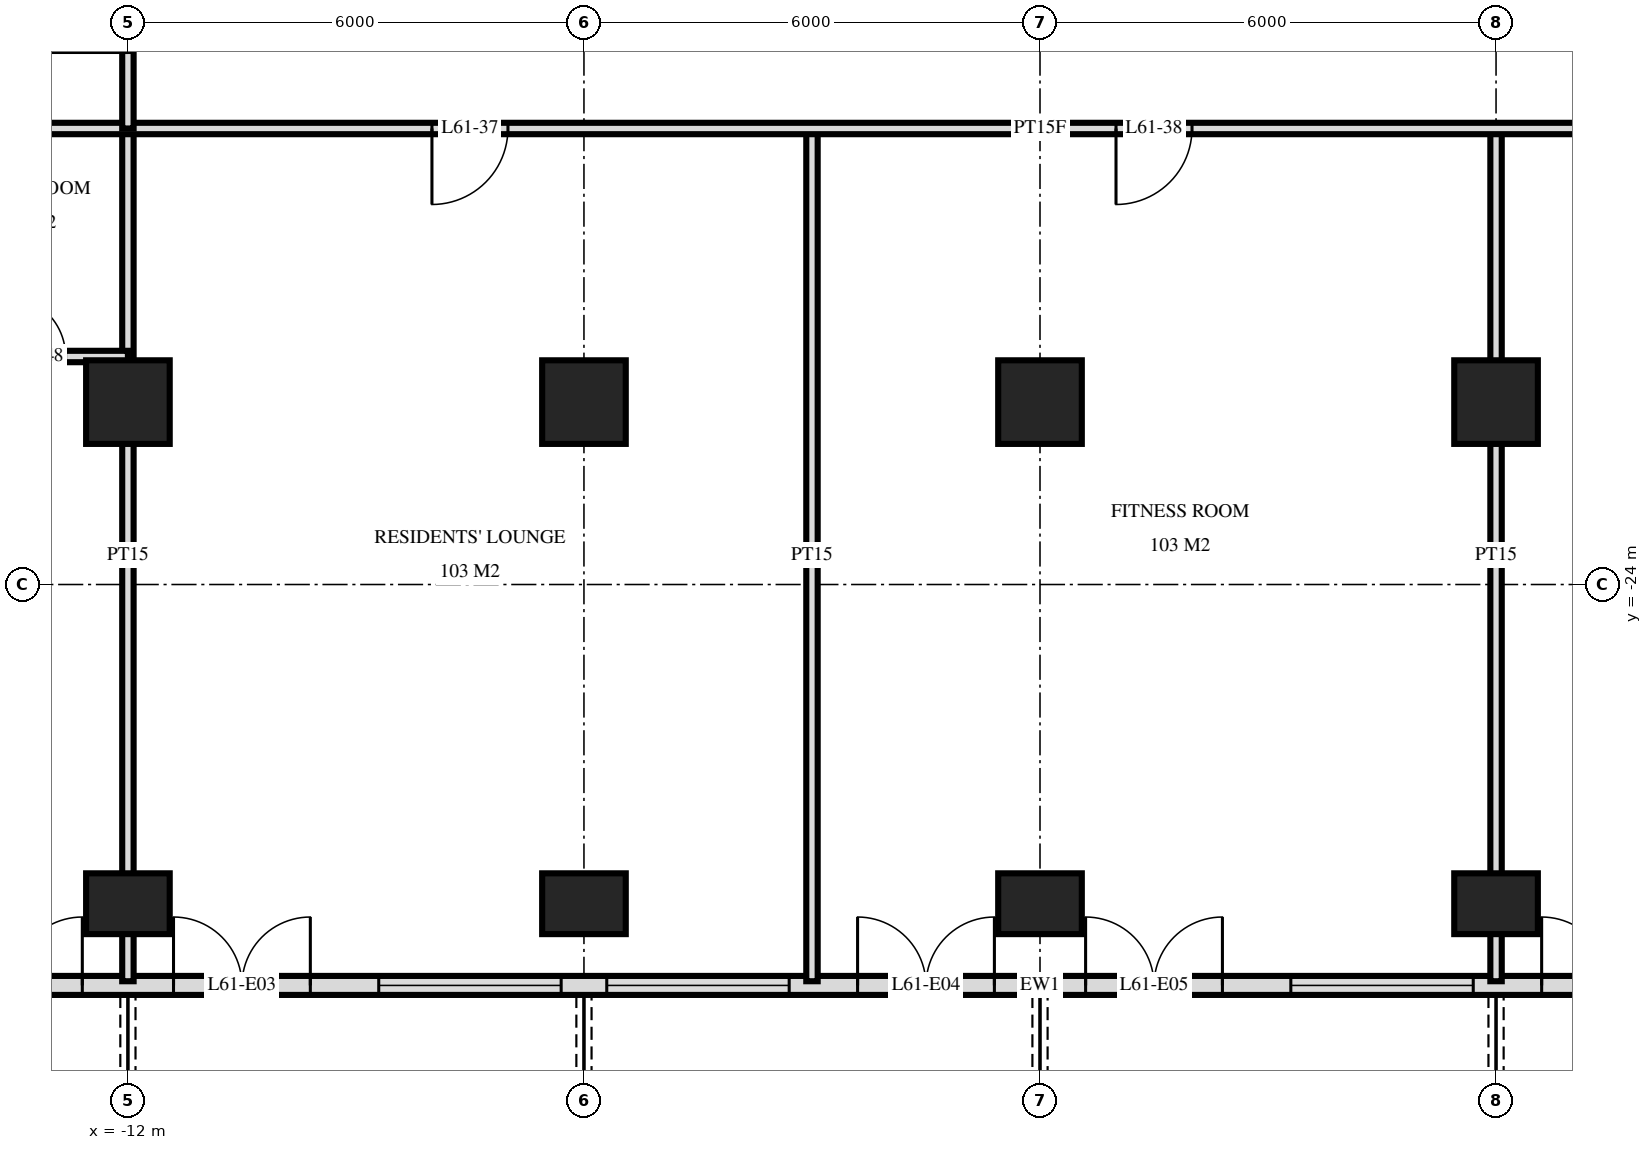
"""IFC4 building model, lengths in metres.
Left out: names, types, materials, properties, quantities, classifications, styles, units other than length and angle.
Written with IfcOpenShell. Run it as: python <this file> out.ifc"""

import sys

from ifc_helpers import new_model, si_unit, direction, frame, frame_2d, origin, origin_2d, place, context, subcontext, project, spatial, rectangle, extrude, element, fill, save


model = new_model("IFC4")
c1 = context("Model", 3, precision=1e-05, world=origin(), true_north=direction((0.0, 1.0)))
c2 = subcontext(c1, "Body", "Model", "MODEL_VIEW")
j1 = project(units=[si_unit("LENGTHUNIT", "METRE"), si_unit("PLANEANGLEUNIT", "RADIAN")], contexts=[c1])
p1 = place(None, origin())
s1 = spatial("IfcSite", under=j1, at=p1, CompositionType="ELEMENT")
p2 = place(p1, origin())
s2 = spatial("IfcBuilding", under=s1, at=p2, CompositionType="ELEMENT")
p3 = place(p2, frame((0.0, 0.0, 232.6)))
s3 = spatial("IfcBuildingStorey", under=s2, at=p3, CompositionType="ELEMENT", Elevation=232.6)
p4 = place(p3, frame((-12.0, -28.2, 0.0), z_axis=(0.0, 0.0, 1.0), x_axis=(1.0, 0.0, 0.0)))
e1 = element("IfcColumn", 1, at=p4, inside=s3, PredefinedType="COLUMN", context=c2, shape_type="SweptSolid", body=[
    extrude(rectangle(XDim=1.1, YDim=0.8, at=origin_2d()), origin(), (0.0, 0.0, 1.0), 3.5),
])
p5 = place(p3, frame((-12.0, -21.6, 0.0), z_axis=(0.0, 0.0, 1.0), x_axis=(1.0, 0.0, 0.0)))
e2 = element("IfcColumn", 2, at=p5, inside=s3, PredefinedType="COLUMN", context=c2, shape_type="SweptSolid", body=[
    extrude(rectangle(XDim=1.1, YDim=1.1, at=origin_2d()), origin(), (0.0, 0.0, 1.0), 3.5),
])
p6 = place(p3, frame((-6.0, -28.2, 0.0), z_axis=(0.0, 0.0, 1.0), x_axis=(1.0, 0.0, 0.0)))
e3 = element("IfcColumn", 3, at=p6, inside=s3, PredefinedType="COLUMN", context=c2, shape_type="SweptSolid", body=[
    extrude(rectangle(XDim=1.1, YDim=0.8, at=origin_2d()), origin(), (0.0, 0.0, 1.0), 3.5),
])
p7 = place(p3, frame((-6.0, -21.6, 0.0), z_axis=(0.0, 0.0, 1.0), x_axis=(1.0, 0.0, 0.0)))
e4 = element("IfcColumn", 4, at=p7, inside=s3, PredefinedType="COLUMN", context=c2, shape_type="SweptSolid", body=[
    extrude(rectangle(XDim=1.1, YDim=1.1, at=origin_2d()), origin(), (0.0, 0.0, 1.0), 3.5),
])
p8 = place(p3, frame((0.0, -28.2, 0.0), z_axis=(0.0, 0.0, 1.0), x_axis=(1.0, 0.0, 0.0)))
e5 = element("IfcColumn", 5, at=p8, inside=s3, PredefinedType="COLUMN", context=c2, shape_type="SweptSolid", body=[
    extrude(rectangle(XDim=1.1, YDim=0.8, at=origin_2d()), origin(), (0.0, 0.0, 1.0), 3.5),
])
p9 = place(p3, frame((0.0, -21.6, 0.0), z_axis=(0.0, 0.0, 1.0), x_axis=(1.0, 0.0, 0.0)))
e6 = element("IfcColumn", 6, at=p9, inside=s3, PredefinedType="COLUMN", context=c2, shape_type="SweptSolid", body=[
    extrude(rectangle(XDim=1.1, YDim=1.1, at=origin_2d()), origin(), (0.0, 0.0, 1.0), 3.5),
])
p10 = place(p3, frame((6.0, -28.2, 0.0), z_axis=(0.0, 0.0, 1.0), x_axis=(1.0, 0.0, 0.0)))
e7 = element("IfcColumn", 7, at=p10, inside=s3, PredefinedType="COLUMN", context=c2, shape_type="SweptSolid", body=[
    extrude(rectangle(XDim=1.1, YDim=0.8, at=origin_2d()), origin(), (0.0, 0.0, 1.0), 3.5),
])
p11 = place(p3, frame((6.0, -21.6, 0.0), z_axis=(0.0, 0.0, 1.0), x_axis=(1.0, 0.0, 0.0)))
e8 = element("IfcColumn", 8, at=p11, inside=s3, PredefinedType="COLUMN", context=c2, shape_type="SweptSolid", body=[
    extrude(rectangle(XDim=1.1, YDim=1.1, at=origin_2d()), origin(), (0.0, 0.0, 1.0), 3.5),
])
p12 = place(p3, frame((-22.475, -29.275, 0.0), z_axis=(0.0, 0.0, 1.0), x_axis=(1.0, 0.0, 0.0)))
e9 = element("IfcWall", 9, at=p12, inside=s3, PredefinedType="SOLIDWALL", context=c2, shape_type="SweptSolid", body=[
    extrude(rectangle(XDim=44.951, YDim=0.25, at=frame_2d((22.475, 0.0))), origin(), (0.0, 0.0, 1.0), 3.22),
])
p13 = place(p12, frame((0.575, 0.0, 0.0)))
e10 = element("IfcOpeningElement", 10, at=p13, cuts=e9, PredefinedType="OPENING", context=c2, shape_type="SweptSolid", body=[
    extrude(rectangle(XDim=1.8, YDim=2.4, at=frame_2d((0.9, 1.2))), frame((0.0, 0.135, 0.0), z_axis=(0.0, -1.0, 0.0), x_axis=(1.0, 0.0, 0.0)), (0.0, 0.0, 1.0), 0.27),
])
p14 = place(p12, frame((8.075, 0.0, 0.0)))
e11 = element("IfcOpeningElement", 11, at=p14, cuts=e9, PredefinedType="OPENING", context=c2, shape_type="SweptSolid", body=[
    extrude(rectangle(XDim=1.8, YDim=2.4, at=frame_2d((0.9, 1.2))), frame((0.0, 0.135, 0.0), z_axis=(0.0, -1.0, 0.0), x_axis=(1.0, 0.0, 0.0)), (0.0, 0.0, 1.0), 0.27),
])
p15 = place(p12, frame((11.075, 0.0, 0.0)))
e12 = element("IfcOpeningElement", 12, at=p15, cuts=e9, PredefinedType="OPENING", context=c2, shape_type="SweptSolid", body=[
    extrude(rectangle(XDim=1.8, YDim=2.4, at=frame_2d((0.9, 1.2))), frame((0.0, 0.135, 0.0), z_axis=(0.0, -1.0, 0.0), x_axis=(1.0, 0.0, 0.0)), (0.0, 0.0, 1.0), 0.27),
])
p16 = place(p12, frame((13.775, 0.0, 0.9)))
e13 = element("IfcOpeningElement", 13, at=p16, cuts=e9, PredefinedType="OPENING", context=c2, shape_type="SweptSolid", body=[
    extrude(rectangle(XDim=2.4, YDim=1.5, at=frame_2d((1.2, 0.75))), frame((0.0, 0.135, 0.0), z_axis=(0.0, -1.0, 0.0), x_axis=(1.0, 0.0, 0.0)), (0.0, 0.0, 1.0), 0.27),
])
p17 = place(p12, frame((16.775, 0.0, 0.9)))
e14 = element("IfcOpeningElement", 14, at=p17, cuts=e9, PredefinedType="OPENING", context=c2, shape_type="SweptSolid", body=[
    extrude(rectangle(XDim=2.4, YDim=1.5, at=frame_2d((1.2, 0.75))), frame((0.0, 0.135, 0.0), z_axis=(0.0, -1.0, 0.0), x_axis=(1.0, 0.0, 0.0)), (0.0, 0.0, 1.0), 0.27),
])
p18 = place(p12, frame((20.075, 0.0, 0.0)))
e15 = element("IfcOpeningElement", 15, at=p18, cuts=e9, PredefinedType="OPENING", context=c2, shape_type="SweptSolid", body=[
    extrude(rectangle(XDim=1.8, YDim=2.4, at=frame_2d((0.9, 1.2))), frame((0.0, 0.135, 0.0), z_axis=(0.0, -1.0, 0.0), x_axis=(1.0, 0.0, 0.0)), (0.0, 0.0, 1.0), 0.27),
])
p19 = place(p12, frame((23.075, 0.0, 0.0)))
e16 = element("IfcOpeningElement", 16, at=p19, cuts=e9, PredefinedType="OPENING", context=c2, shape_type="SweptSolid", body=[
    extrude(rectangle(XDim=1.8, YDim=2.4, at=frame_2d((0.9, 1.2))), frame((0.0, 0.135, 0.0), z_axis=(0.0, -1.0, 0.0), x_axis=(1.0, 0.0, 0.0)), (0.0, 0.0, 1.0), 0.27),
])
p20 = place(p12, frame((25.775, 0.0, 0.9)))
e17 = element("IfcOpeningElement", 17, at=p20, cuts=e9, PredefinedType="OPENING", context=c2, shape_type="SweptSolid", body=[
    extrude(rectangle(XDim=2.4, YDim=1.5, at=frame_2d((1.2, 0.75))), frame((0.0, 0.135, 0.0), z_axis=(0.0, -1.0, 0.0), x_axis=(1.0, 0.0, 0.0)), (0.0, 0.0, 1.0), 0.27),
])
p21 = place(p12, frame((29.075, 0.0, 0.0)))
e18 = element("IfcOpeningElement", 18, at=p21, cuts=e9, PredefinedType="OPENING", context=c2, shape_type="SweptSolid", body=[
    extrude(rectangle(XDim=1.8, YDim=2.4, at=frame_2d((0.9, 1.2))), frame((0.0, 0.135, 0.0), z_axis=(0.0, -1.0, 0.0), x_axis=(1.0, 0.0, 0.0)), (0.0, 0.0, 1.0), 0.27),
])
p22 = place(p12, frame((31.775, 0.0, 0.9)))
e19 = element("IfcOpeningElement", 19, at=p22, cuts=e9, PredefinedType="OPENING", context=c2, shape_type="SweptSolid", body=[
    extrude(rectangle(XDim=2.4, YDim=1.5, at=frame_2d((1.2, 0.75))), frame((0.0, 0.135, 0.0), z_axis=(0.0, -1.0, 0.0), x_axis=(1.0, 0.0, 0.0)), (0.0, 0.0, 1.0), 0.27),
])
p23 = place(p12, frame((35.075, 0.0, 0.0)))
e20 = element("IfcOpeningElement", 20, at=p23, cuts=e9, PredefinedType="OPENING", context=c2, shape_type="SweptSolid", body=[
    extrude(rectangle(XDim=1.8, YDim=2.4, at=frame_2d((0.9, 1.2))), frame((0.0, 0.135, 0.0), z_axis=(0.0, -1.0, 0.0), x_axis=(1.0, 0.0, 0.0)), (0.0, 0.0, 1.0), 0.27),
])
p24 = place(p12, frame((37.775, 0.0, 0.9)))
e21 = element("IfcOpeningElement", 21, at=p24, cuts=e9, PredefinedType="OPENING", context=c2, shape_type="SweptSolid", body=[
    extrude(rectangle(XDim=2.4, YDim=1.5, at=frame_2d((1.2, 0.75))), frame((0.0, 0.135, 0.0), z_axis=(0.0, -1.0, 0.0), x_axis=(1.0, 0.0, 0.0)), (0.0, 0.0, 1.0), 0.27),
])
p25 = place(p12, frame((41.075, 0.0, 0.0)))
e22 = element("IfcOpeningElement", 22, at=p25, cuts=e9, PredefinedType="OPENING", context=c2, shape_type="SweptSolid", body=[
    extrude(rectangle(XDim=1.8, YDim=2.4, at=frame_2d((0.9, 1.2))), frame((0.0, 0.135, 0.0), z_axis=(0.0, -1.0, 0.0), x_axis=(1.0, 0.0, 0.0)), (0.0, 0.0, 1.0), 0.27),
])
for number, where, z_axis, x_axis in (
    (23, (6.0, -29.22, 0.0), (0.0, 0.0, 1.0), (0.0, 1.0, 0.0)),
    (24, (-3.0, -29.22, 0.0), (0.0, 0.0, 1.0), (0.0, 1.0, 0.0)),
):
    element("IfcWall", number, at=place(p3, frame(where, z_axis=z_axis, x_axis=x_axis)), inside=s3, PredefinedType="PARTITIONING", context=c2, shape_type="SweptSolid", body=[
        extrude(rectangle(XDim=11.22, YDim=0.15, at=frame_2d((5.61, 0.0))), origin(), (0.0, 0.0, 1.0), 3.22),
    ])
p26 = place(p3, frame((-12.0, -18.0, 0.0), z_axis=(0.0, 0.0, 1.0), x_axis=(0.0, 1.0, 0.0)))
e25 = element("IfcWall", 25, at=p26, inside=s3, PredefinedType="PARTITIONING", context=c2, shape_type="SweptSolid", body=[
    extrude(rectangle(XDim=2.95, YDim=0.15, at=frame_2d((1.475, 0.0))), origin(), (0.0, 0.0, 1.0), 3.22),
])
p27 = place(p26, frame((1.0, 0.0, 0.0)))
e26 = element("IfcOpeningElement", 26, at=p27, cuts=e25, PredefinedType="OPENING", context=c2, shape_type="SweptSolid", body=[
    extrude(rectangle(XDim=1.0, YDim=2.1, at=frame_2d((0.5, 1.05))), frame((0.0, 0.085, 0.0), z_axis=(0.0, -1.0, 0.0), x_axis=(1.0, 0.0, 0.0)), (0.0, 0.0, 1.0), 0.17),
])
p28 = place(p3, frame((-12.0, -29.22, 0.0), z_axis=(0.0, 0.0, 1.0), x_axis=(0.0, 1.0, 0.0)))
e27 = element("IfcWall", 27, at=p28, inside=s3, PredefinedType="PARTITIONING", context=c2, shape_type="SweptSolid", body=[
    extrude(rectangle(XDim=11.22, YDim=0.15, at=frame_2d((5.61, 0.0))), origin(), (0.0, 0.0, 1.0), 3.22),
])
p29 = place(p3, frame((-20.4, -21.0, 0.0), z_axis=(0.0, 0.0, 1.0), x_axis=(1.0, 0.0, 0.0)))
e28 = element("IfcWall", 28, at=p29, inside=s3, PredefinedType="PARTITIONING", context=c2, shape_type="SweptSolid", body=[
    extrude(rectangle(XDim=8.4, YDim=0.15, at=frame_2d((4.2, 0.0))), origin(), (0.0, 0.0, 1.0), 3.22),
])
p30 = place(p29, frame((6.78, 0.0, 0.0)))
e29 = element("IfcOpeningElement", 29, at=p30, cuts=e28, PredefinedType="OPENING", context=c2, shape_type="SweptSolid", body=[
    extrude(rectangle(XDim=0.8, YDim=2.1, at=frame_2d((0.4, 1.05))), frame((0.0, 0.085, 0.0), z_axis=(0.0, -1.0, 0.0), x_axis=(1.0, 0.0, 0.0)), (0.0, 0.0, 1.0), 0.17),
])
p31 = place(p29, frame((4.48, 0.0, 0.0)))
e30 = element("IfcOpeningElement", 30, at=p31, cuts=e28, PredefinedType="OPENING", context=c2, shape_type="SweptSolid", body=[
    extrude(rectangle(XDim=0.9, YDim=2.1, at=frame_2d((0.45, 1.05))), frame((0.0, 0.085, 0.0), z_axis=(0.0, -1.0, 0.0), x_axis=(1.0, 0.0, 0.0)), (0.0, 0.0, 1.0), 0.17),
])
p32 = place(p3, frame((-26.82, -18.0, 0.0), z_axis=(0.0, 0.0, 1.0), x_axis=(1.0, 0.0, 0.0)))
e31 = element("IfcWall", 31, at=p32, inside=s3, PredefinedType="PARTITIONING", context=c2, shape_type="SweptSolid", body=[
    extrude(rectangle(XDim=53.64, YDim=0.15, at=frame_2d((26.82, 0.0))), origin(), (0.0, 0.0, 1.0), 3.22),
])
p33 = place(p32, frame((4.92, 0.0, 0.0)))
e32 = element("IfcOpeningElement", 32, at=p33, cuts=e31, PredefinedType="OPENING", context=c2, shape_type="SweptSolid", body=[
    extrude(rectangle(XDim=1.0, YDim=2.1, at=frame_2d((0.5, 1.05))), frame((0.0, 0.085, 0.0), z_axis=(0.0, -1.0, 0.0), x_axis=(1.0, 0.0, 0.0)), (0.0, 0.0, 1.0), 0.17),
])
p34 = place(p32, frame((1.62, 0.0, 0.0)))
e33 = element("IfcOpeningElement", 33, at=p34, cuts=e31, PredefinedType="OPENING", context=c2, shape_type="SweptSolid", body=[
    extrude(rectangle(XDim=1.0, YDim=2.1, at=frame_2d((0.5, 1.05))), frame((0.0, 0.085, 0.0), z_axis=(0.0, -1.0, 0.0), x_axis=(1.0, 0.0, 0.0)), (0.0, 0.0, 1.0), 0.17),
])
p35 = place(p32, frame((38.97, 0.0, 0.0)))
e34 = element("IfcOpeningElement", 34, at=p35, cuts=e31, PredefinedType="OPENING", context=c2, shape_type="SweptSolid", body=[
    extrude(rectangle(XDim=1.0, YDim=2.1, at=frame_2d((0.5, 1.05))), frame((0.0, 0.085, 0.0), z_axis=(0.0, -1.0, 0.0), x_axis=(1.0, 0.0, 0.0)), (0.0, 0.0, 1.0), 0.17),
])
p36 = place(p32, frame((48.72, 0.0, 0.0)))
e35 = element("IfcOpeningElement", 35, at=p36, cuts=e31, PredefinedType="OPENING", context=c2, shape_type="SweptSolid", body=[
    extrude(rectangle(XDim=1.0, YDim=2.1, at=frame_2d((0.5, 1.05))), frame((0.0, 0.085, 0.0), z_axis=(0.0, -1.0, 0.0), x_axis=(1.0, 0.0, 0.0)), (0.0, 0.0, 1.0), 0.17),
])
p37 = place(p32, frame((46.92, 0.0, 0.0)))
e36 = element("IfcOpeningElement", 36, at=p37, cuts=e31, PredefinedType="OPENING", context=c2, shape_type="SweptSolid", body=[
    extrude(rectangle(XDim=1.0, YDim=2.1, at=frame_2d((0.5, 1.05))), frame((0.0, 0.085, 0.0), z_axis=(0.0, -1.0, 0.0), x_axis=(1.0, 0.0, 0.0)), (0.0, 0.0, 1.0), 0.17),
])
p38 = place(p32, frame((18.82, 0.0, 0.0)))
e37 = element("IfcOpeningElement", 37, at=p38, cuts=e31, PredefinedType="OPENING", context=c2, shape_type="SweptSolid", body=[
    extrude(rectangle(XDim=1.0, YDim=2.1, at=frame_2d((0.5, 1.05))), frame((0.0, 0.085, 0.0), z_axis=(0.0, -1.0, 0.0), x_axis=(1.0, 0.0, 0.0)), (0.0, 0.0, 1.0), 0.17),
])
p39 = place(p32, frame((27.82, 0.0, 0.0)))
e38 = element("IfcOpeningElement", 38, at=p39, cuts=e31, PredefinedType="OPENING", context=c2, shape_type="SweptSolid", body=[
    extrude(rectangle(XDim=1.0, YDim=2.1, at=frame_2d((0.5, 1.05))), frame((0.0, 0.085, 0.0), z_axis=(0.0, -1.0, 0.0), x_axis=(1.0, 0.0, 0.0)), (0.0, 0.0, 1.0), 0.17),
])
p40 = place(p32, frame((35.32, 0.0, 0.0)))
e39 = element("IfcOpeningElement", 39, at=p40, cuts=e31, PredefinedType="OPENING", context=c2, shape_type="SweptSolid", body=[
    extrude(rectangle(XDim=1.0, YDim=2.1, at=frame_2d((0.5, 1.05))), frame((0.0, 0.085, 0.0), z_axis=(0.0, -1.0, 0.0), x_axis=(1.0, 0.0, 0.0)), (0.0, 0.0, 1.0), 0.17),
])
p41 = place(p14, origin())
e40 = element("IfcDoor", 40, at=p41, inside=s3, OperationType="DOUBLE_DOOR_SINGLE_SWING", PredefinedType="DOOR", context=c2, shape_type="SweptSolid", body=[
    extrude(rectangle(XDim=1.8, YDim=2.4, at=frame_2d((0.9, 1.2))), frame((0.0, 0.025, 0.0), z_axis=(0.0, -1.0, 0.0), x_axis=(1.0, 0.0, 0.0)), (0.0, 0.0, 1.0), 0.05),
])
fill(e11, e40)
p42 = place(p15, origin())
e41 = element("IfcDoor", 41, at=p42, inside=s3, OperationType="DOUBLE_DOOR_SINGLE_SWING", PredefinedType="DOOR", context=c2, shape_type="SweptSolid", body=[
    extrude(rectangle(XDim=1.8, YDim=2.4, at=frame_2d((0.9, 1.2))), frame((0.0, 0.025, 0.0), z_axis=(0.0, -1.0, 0.0), x_axis=(1.0, 0.0, 0.0)), (0.0, 0.0, 1.0), 0.05),
])
fill(e12, e41)
p43 = place(p16, origin())
e42 = element("IfcWindow", 42, at=p43, inside=s3, PartitioningType="SINGLE_PANEL", PredefinedType="WINDOW", context=c2, shape_type="SweptSolid", body=[
    extrude(rectangle(XDim=2.4, YDim=1.5, at=frame_2d((1.2, 0.75))), frame((0.0, 0.03, 0.0), z_axis=(0.0, -1.0, 0.0), x_axis=(1.0, 0.0, 0.0)), (0.0, 0.0, 1.0), 0.06),
])
fill(e13, e42)
p44 = place(p17, origin())
e43 = element("IfcWindow", 43, at=p44, inside=s3, PartitioningType="SINGLE_PANEL", PredefinedType="WINDOW", context=c2, shape_type="SweptSolid", body=[
    extrude(rectangle(XDim=2.4, YDim=1.5, at=frame_2d((1.2, 0.75))), frame((0.0, 0.03, 0.0), z_axis=(0.0, -1.0, 0.0), x_axis=(1.0, 0.0, 0.0)), (0.0, 0.0, 1.0), 0.06),
])
fill(e14, e43)
p45 = place(p18, origin())
e44 = element("IfcDoor", 44, at=p45, inside=s3, OperationType="DOUBLE_DOOR_SINGLE_SWING", PredefinedType="DOOR", context=c2, shape_type="SweptSolid", body=[
    extrude(rectangle(XDim=1.8, YDim=2.4, at=frame_2d((0.9, 1.2))), frame((0.0, 0.025, 0.0), z_axis=(0.0, -1.0, 0.0), x_axis=(1.0, 0.0, 0.0)), (0.0, 0.0, 1.0), 0.05),
])
fill(e15, e44)
p46 = place(p19, origin())
e45 = element("IfcDoor", 45, at=p46, inside=s3, OperationType="DOUBLE_DOOR_SINGLE_SWING", PredefinedType="DOOR", context=c2, shape_type="SweptSolid", body=[
    extrude(rectangle(XDim=1.8, YDim=2.4, at=frame_2d((0.9, 1.2))), frame((0.0, 0.025, 0.0), z_axis=(0.0, -1.0, 0.0), x_axis=(1.0, 0.0, 0.0)), (0.0, 0.0, 1.0), 0.05),
])
fill(e16, e45)
p47 = place(p20, origin())
e46 = element("IfcWindow", 46, at=p47, inside=s3, PartitioningType="SINGLE_PANEL", PredefinedType="WINDOW", context=c2, shape_type="SweptSolid", body=[
    extrude(rectangle(XDim=2.4, YDim=1.5, at=frame_2d((1.2, 0.75))), frame((0.0, 0.03, 0.0), z_axis=(0.0, -1.0, 0.0), x_axis=(1.0, 0.0, 0.0)), (0.0, 0.0, 1.0), 0.06),
])
fill(e17, e46)
p48 = place(p21, origin())
e47 = element("IfcDoor", 47, at=p48, inside=s3, OperationType="DOUBLE_DOOR_SINGLE_SWING", PredefinedType="DOOR", context=c2, shape_type="SweptSolid", body=[
    extrude(rectangle(XDim=1.8, YDim=2.4, at=frame_2d((0.9, 1.2))), frame((0.0, 0.025, 0.0), z_axis=(0.0, -1.0, 0.0), x_axis=(1.0, 0.0, 0.0)), (0.0, 0.0, 1.0), 0.05),
])
fill(e18, e47)
p49 = place(p38, frame((0.5, 0.0, 0.0), z_axis=(0.0, 0.0, 1.0), x_axis=(-1.0, 0.0, 0.0)))
e48 = element("IfcDoor", 48, at=p49, inside=s3, OperationType="SINGLE_SWING_LEFT", PredefinedType="DOOR", context=c2, shape_type="SweptSolid", body=[
    extrude(rectangle(XDim=1.0, YDim=2.1, at=frame_2d((0.0, 1.05))), frame((0.0, -0.025, 0.0), z_axis=(0.0, 1.0, 0.0), x_axis=(-1.0, 0.0, 0.0)), (0.0, 0.0, 1.0), 0.05),
])
fill(e37, e48)
p50 = place(p39, frame((0.5, 0.0, 0.0), z_axis=(0.0, 0.0, 1.0), x_axis=(-1.0, 0.0, 0.0)))
e49 = element("IfcDoor", 49, at=p50, inside=s3, OperationType="SINGLE_SWING_LEFT", PredefinedType="DOOR", context=c2, shape_type="SweptSolid", body=[
    extrude(rectangle(XDim=1.0, YDim=2.1, at=frame_2d((0.0, 1.05))), frame((0.0, -0.025, 0.0), z_axis=(0.0, 1.0, 0.0), x_axis=(-1.0, 0.0, 0.0)), (0.0, 0.0, 1.0), 0.05),
])
fill(e38, e49)
p51 = place(p30, origin())
e50 = element("IfcDoor", 50, at=p51, inside=s3, OperationType="SINGLE_SWING_RIGHT", PredefinedType="DOOR", context=c2, shape_type="SweptSolid", body=[
    extrude(rectangle(XDim=0.8, YDim=2.1, at=frame_2d((0.4, 1.05))), frame((0.0, 0.025, 0.0), z_axis=(0.0, -1.0, 0.0), x_axis=(1.0, 0.0, 0.0)), (0.0, 0.0, 1.0), 0.05),
])
fill(e29, e50)
save(model, sys.argv[1])
